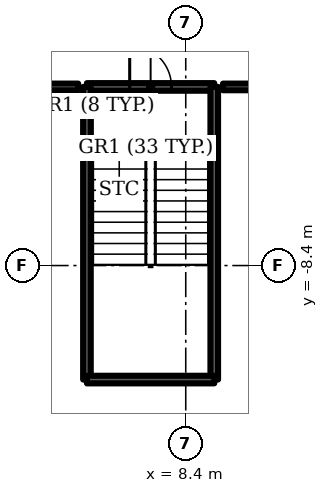
"""IFC4 building model, lengths in metres.
Left out: names, types, materials, properties, quantities, classifications, styles, units other than length and angle.
Written with IfcOpenShell. Run it as: python <this file> out.ifc"""

import sys

from ifc_helpers import new_model, si_unit, direction, frame, frame_2d, origin, place, context, subcontext, project, spatial, rectangle, extrude, element, fill, save


model = new_model("IFC4")
c1 = context("Model", 3, precision=1e-05, world=origin(), true_north=direction((0.0, 1.0)))
c2 = subcontext(c1, "Body", "Model", "MODEL_VIEW")
j1 = project(units=[si_unit("LENGTHUNIT", "METRE"), si_unit("PLANEANGLEUNIT", "RADIAN")], contexts=[c1])
p1 = place(None, origin())
s1 = spatial("IfcSite", under=j1, at=p1, CompositionType="ELEMENT")
p2 = place(p1, origin())
s2 = spatial("IfcBuilding", under=s1, at=p2, CompositionType="ELEMENT")
p3 = place(p2, frame((0.0, 0.0, 6.0)))
s3 = spatial("IfcBuildingStorey", under=s2, at=p3, CompositionType="ELEMENT", Elevation=6.0)
p4 = place(p3, frame((5.8, -3.7, -0.35), z_axis=(0.0, 0.0, 1.0), x_axis=(1.0, 0.0, 0.0)))
e1 = element("IfcWall", 1, at=p4, inside=s3, PredefinedType="SOLIDWALL", context=c2, shape_type="SweptSolid", body=[
    extrude(rectangle(XDim=3.35, YDim=0.2, at=frame_2d((1.675, 0.0))), origin(), (0.0, 0.0, 1.0), 4.05),
])
p5 = place(p4, frame((1.125, 0.0, 0.0)))
e2 = element("IfcOpeningElement", 2, at=p5, cuts=e1, PredefinedType="OPENING", context=c2, shape_type="SweptSolid", body=[
    extrude(rectangle(XDim=1.1, YDim=2.1, at=frame_2d((0.55, 1.05))), frame((0.0, 0.1, 0.0), z_axis=(0.0, -1.0, 0.0), x_axis=(1.0, 0.0, 0.0)), (0.0, 0.0, 1.0), 0.2),
])
for number, where, z_axis, x_axis in (
    (3, (5.8, -3.7, -0.35), (0.0, 0.0, 1.0), (0.0, -1.0, 0.0)),
    (4, (9.15, -3.7, -0.35), (0.0, 0.0, 1.0), (0.0, -1.0, 0.0)),
):
    element("IfcWall", number, at=place(p3, frame(where, z_axis=z_axis, x_axis=x_axis)), inside=s3, PredefinedType="SOLIDWALL", context=c2, shape_type="SweptSolid", body=[
        extrude(rectangle(XDim=7.7, YDim=0.2, at=frame_2d((3.85, 0.0))), origin(), (0.0, 0.0, 1.0), 4.05),
    ])
p6 = place(p3, frame((5.8, -11.4, -0.35), z_axis=(0.0, 0.0, 1.0), x_axis=(1.0, 0.0, 0.0)))
e5 = element("IfcWall", 5, at=p6, inside=s3, PredefinedType="SOLIDWALL", context=c2, shape_type="SweptSolid", body=[
    extrude(rectangle(XDim=3.35, YDim=0.2, at=frame_2d((1.675, 0.0))), origin(), (0.0, 0.0, 1.0), 4.05),
])
p7 = place(p3, frame((-5.57, -3.7, 0.0), z_axis=(0.0, 0.0, 1.0), x_axis=(1.0, 0.0, 0.0)))
e6 = element("IfcWall", 6, at=p7, inside=s3, PredefinedType="PARTITIONING", context=c2, shape_type="SweptSolid", body=[
    extrude(rectangle(XDim=11.14, YDim=0.175, at=frame_2d((5.57, 0.0))), origin(), (0.0, 0.0, 1.0), 3.65),
])
p8 = place(p7, frame((4.77, 0.0, 0.0)))
e7 = element("IfcOpeningElement", 7, at=p8, cuts=e6, PredefinedType="OPENING", context=c2, shape_type="SweptSolid", body=[
    extrude(rectangle(XDim=1.6, YDim=2.1, at=frame_2d((0.8, 1.05))), frame((0.0, 0.087, 0.0), z_axis=(0.0, -1.0, 0.0), x_axis=(1.0, 0.0, 0.0)), (0.0, 0.0, 1.0), 0.175),
])
p9 = place(p3, frame((9.38, -3.7, 0.0), z_axis=(0.0, 0.0, 1.0), x_axis=(1.0, 0.0, 0.0)))
e8 = element("IfcWall", 8, at=p9, inside=s3, PredefinedType="PARTITIONING", context=c2, shape_type="SweptSolid", body=[
    extrude(rectangle(XDim=4.62, YDim=0.175, at=frame_2d((2.31, 0.0))), origin(), (0.0, 0.0, 1.0), 3.65),
])
p10 = place(p5, origin())
e9 = element("IfcDoor", 9, at=p10, inside=s3, OperationType="SINGLE_SWING_LEFT", PredefinedType="DOOR", context=c2, shape_type="SweptSolid", body=[
    extrude(rectangle(XDim=1.1, YDim=2.1, at=frame_2d((0.55, 1.05))), frame((0.0, 0.025, 0.0), z_axis=(0.0, -1.0, 0.0), x_axis=(1.0, 0.0, 0.0)), (0.0, 0.0, 1.0), 0.05),
])
fill(e2, e9)
save(model, sys.argv[1])
